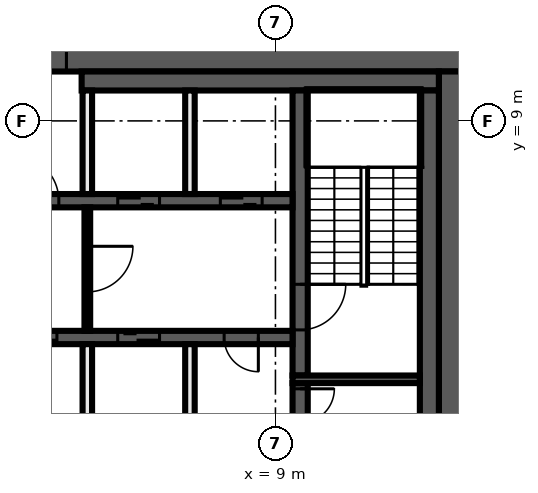
"""IFC4 building model, lengths in metres.
Left out: names, types, materials, properties, quantities, classifications, styles, units other than length and angle.
Written with IfcOpenShell. Run it as: python <this file> out.ifc"""

import sys

from ifc_helpers import new_model, si_unit, direction, frame, frame_2d, origin, place, context, subcontext, project, spatial, rectangle, extrude, element, fill, save


model = new_model("IFC4")
c1 = context("Model", 3, precision=1e-05, world=origin(), true_north=direction((0.0, 1.0)))
c2 = subcontext(c1, "Body", "Model", "MODEL_VIEW")
j1 = project(units=[si_unit("LENGTHUNIT", "METRE"), si_unit("PLANEANGLEUNIT", "RADIAN")], contexts=[c1])
p1 = place(None, origin())
s1 = spatial("IfcSite", under=j1, at=p1, CompositionType="ELEMENT")
p2 = place(p1, origin())
s2 = spatial("IfcBuilding", under=s1, at=p2, CompositionType="ELEMENT")
p3 = place(p2, frame((0.0, 0.0, 249.6)))
s3 = spatial("IfcBuildingStorey", under=s2, at=p3, CompositionType="ELEMENT", Elevation=249.6)
p4 = place(p3, frame((-14.0, 10.65, 0.0), z_axis=(0.0, 0.0, 1.0), x_axis=(1.0, 0.0, 0.0)))
e1 = element("IfcWall", 1, at=p4, inside=s3, PredefinedType="SHEAR", context=c2, shape_type="SweptSolid", body=[
    extrude(rectangle(XDim=28.0, YDim=0.7, at=frame_2d((14.0, 0.0))), origin(), (0.0, 0.0, 1.0), 3.82),
])
p5 = place(p4, frame((15.9, 0.0, 0.0)))
e2 = element("IfcOpeningElement", 2, at=p5, cuts=e1, PredefinedType="OPENING", context=c2, shape_type="SweptSolid", body=[
    extrude(rectangle(XDim=1.6, YDim=2.1, at=frame_2d((0.8, 1.05))), frame((0.0, 0.36, 0.0), z_axis=(0.0, -1.0, 0.0), x_axis=(1.0, 0.0, 0.0)), (0.0, 0.0, 1.0), 0.72),
])
p6 = place(p3, frame((13.65, 10.3, 0.0), z_axis=(0.0, 0.0, 1.0), x_axis=(0.0, -1.0, 0.0)))
e3 = element("IfcWall", 3, at=p6, inside=s3, PredefinedType="SHEAR", context=c2, shape_type="SweptSolid", body=[
    extrude(rectangle(XDim=20.6, YDim=0.7, at=frame_2d((10.3, 0.0))), origin(), (0.0, 0.0, 1.0), 3.82),
])
p7 = place(p3, frame((3.9, 10.05, 0.0), z_axis=(0.0, 0.0, 1.0), x_axis=(1.0, 0.0, 0.0)))
e4 = element("IfcWall", 4, at=p7, inside=s3, PredefinedType="SHEAR", context=c2, shape_type="SweptSolid", body=[
    extrude(rectangle(XDim=9.4, YDim=0.5, at=frame_2d((4.7, 0.0))), origin(), (0.0, 0.0, 1.0), 3.82),
])
p8 = place(p3, frame((13.05, 9.8, 0.0), z_axis=(0.0, 0.0, 1.0), x_axis=(0.0, -1.0, 0.0)))
e5 = element("IfcWall", 5, at=p8, inside=s3, PredefinedType="SHEAR", context=c2, shape_type="SweptSolid", body=[
    extrude(rectangle(XDim=19.6, YDim=0.5, at=frame_2d((9.8, 0.0))), origin(), (0.0, 0.0, 1.0), 3.82),
])
p9 = place(p3, frame((9.65, 2.1, 0.0), z_axis=(0.0, 0.0, 1.0), x_axis=(0.0, -1.0, 0.0)))
e6 = element("IfcWall", 6, at=p9, inside=s3, PredefinedType="SHEAR", context=c2, shape_type="SweptSolid", body=[
    extrude(rectangle(XDim=4.2, YDim=0.4, at=frame_2d((2.1, 0.0))), origin(), (0.0, 0.0, 1.0), 3.82),
])
p10 = place(p9, frame((0.15, 0.0, 0.0)))
e7 = element("IfcOpeningElement", 7, at=p10, cuts=e6, PredefinedType="OPENING", context=c2, shape_type="SweptSolid", body=[
    extrude(rectangle(XDim=0.9, YDim=2.1, at=frame_2d((0.45, 1.05))), frame((0.0, 0.21, 0.0), z_axis=(0.0, -1.0, 0.0), x_axis=(1.0, 0.0, 0.0)), (0.0, 0.0, 1.0), 0.42),
])
p11 = place(p3, frame((9.65, 9.8, 0.0), z_axis=(0.0, 0.0, 1.0), x_axis=(0.0, -1.0, 0.0)))
e8 = element("IfcWall", 8, at=p11, inside=s3, PredefinedType="SHEAR", context=c2, shape_type="SweptSolid", body=[
    extrude(rectangle(XDim=7.5, YDim=0.4, at=frame_2d((3.75, 0.0))), origin(), (0.0, 0.0, 1.0), 3.82),
])
p12 = place(p11, frame((5.1, 0.0, 0.0)))
e9 = element("IfcOpeningElement", 9, at=p12, cuts=e8, PredefinedType="OPENING", context=c2, shape_type="SweptSolid", body=[
    extrude(rectangle(XDim=1.2, YDim=2.1, at=frame_2d((0.6, 1.05))), frame((0.0, 0.21, 0.0), z_axis=(0.0, -1.0, 0.0), x_axis=(1.0, 0.0, 0.0)), (0.0, 0.0, 1.0), 0.42),
])
p13 = place(p3, frame((9.45, 2.2, 0.0), z_axis=(0.0, 0.0, 1.0), x_axis=(1.0, 0.0, 0.0)))
e10 = element("IfcWall", 10, at=p13, inside=s3, PredefinedType="SHEAR", context=c2, shape_type="SweptSolid", body=[
    extrude(rectangle(XDim=3.35, YDim=0.2, at=frame_2d((1.675, 0.0))), origin(), (0.0, 0.0, 1.0), 3.82),
])
p14 = place(p3, frame((-9.45, 6.9, 0.0), z_axis=(0.0, 0.0, 1.0), x_axis=(1.0, 0.0, 0.0)))
e11 = element("IfcWall", 11, at=p14, inside=s3, PredefinedType="SHEAR", context=c2, shape_type="SweptSolid", body=[
    extrude(rectangle(XDim=18.9, YDim=0.35, at=frame_2d((9.45, 0.0))), origin(), (0.0, 0.0, 1.0), 3.82),
])
p15 = place(p14, frame((11.55, 0.0, 0.0)))
e12 = element("IfcOpeningElement", 12, at=p15, cuts=e11, PredefinedType="OPENING", context=c2, shape_type="SweptSolid", body=[
    extrude(rectangle(XDim=1.2, YDim=2.1, at=frame_2d((0.6, 1.05))), frame((0.0, 0.185, 0.0), z_axis=(0.0, -1.0, 0.0), x_axis=(1.0, 0.0, 0.0)), (0.0, 0.0, 1.0), 0.37),
])
p16 = place(p14, frame((14.3, 0.0, 0.0)))
e13 = element("IfcOpeningElement", 13, at=p16, cuts=e11, PredefinedType="OPENING", context=c2, shape_type="SweptSolid", body=[
    extrude(rectangle(XDim=1.1, YDim=2.1, at=frame_2d((0.55, 1.05))), frame((0.0, 0.185, 0.0), z_axis=(0.0, -1.0, 0.0), x_axis=(1.0, 0.0, 0.0)), (0.0, 0.0, 1.0), 0.37),
])
p17 = place(p14, frame((17.0, 0.0, 0.0)))
e14 = element("IfcOpeningElement", 14, at=p17, cuts=e11, PredefinedType="OPENING", context=c2, shape_type="SweptSolid", body=[
    extrude(rectangle(XDim=1.1, YDim=2.1, at=frame_2d((0.55, 1.05))), frame((0.0, 0.185, 0.0), z_axis=(0.0, -1.0, 0.0), x_axis=(1.0, 0.0, 0.0)), (0.0, 0.0, 1.0), 0.37),
])
p18 = place(p14, frame((0.9, 0.0, 0.0)))
e15 = element("IfcOpeningElement", 15, at=p18, cuts=e11, PredefinedType="OPENING", context=c2, shape_type="SweptSolid", body=[
    extrude(rectangle(XDim=0.9, YDim=2.1, at=frame_2d((0.45, 1.05))), frame((0.0, 0.185, 0.0), z_axis=(0.0, -1.0, 0.0), x_axis=(1.0, 0.0, 0.0)), (0.0, 0.0, 1.0), 0.37),
])
p19 = place(p14, frame((3.6, 0.0, 0.0)))
e16 = element("IfcOpeningElement", 16, at=p19, cuts=e11, PredefinedType="OPENING", context=c2, shape_type="SweptSolid", body=[
    extrude(rectangle(XDim=0.9, YDim=2.1, at=frame_2d((0.45, 1.05))), frame((0.0, 0.185, 0.0), z_axis=(0.0, -1.0, 0.0), x_axis=(1.0, 0.0, 0.0)), (0.0, 0.0, 1.0), 0.37),
])
p20 = place(p14, frame((6.3, 0.0, 0.0)))
e17 = element("IfcOpeningElement", 17, at=p20, cuts=e11, PredefinedType="OPENING", context=c2, shape_type="SweptSolid", body=[
    extrude(rectangle(XDim=0.9, YDim=2.1, at=frame_2d((0.45, 1.05))), frame((0.0, 0.185, 0.0), z_axis=(0.0, -1.0, 0.0), x_axis=(1.0, 0.0, 0.0)), (0.0, 0.0, 1.0), 0.37),
])
p21 = place(p14, frame((9.0, 0.0, 0.0)))
e18 = element("IfcOpeningElement", 18, at=p21, cuts=e11, PredefinedType="OPENING", context=c2, shape_type="SweptSolid", body=[
    extrude(rectangle(XDim=0.9, YDim=2.1, at=frame_2d((0.45, 1.05))), frame((0.0, 0.185, 0.0), z_axis=(0.0, -1.0, 0.0), x_axis=(1.0, 0.0, 0.0)), (0.0, 0.0, 1.0), 0.37),
])
p22 = place(p3, frame((9.45, 3.3, 0.0), z_axis=(0.0, 0.0, 1.0), x_axis=(-1.0, 0.0, 0.0)))
e19 = element("IfcWall", 19, at=p22, inside=s3, PredefinedType="SHEAR", context=c2, shape_type="SweptSolid", body=[
    extrude(rectangle(XDim=18.9, YDim=0.35, at=frame_2d((9.45, 0.0))), origin(), (0.0, 0.0, 1.0), 3.82),
])
p23 = place(p22, frame((6.2, 0.0, 0.0)))
e20 = element("IfcOpeningElement", 20, at=p23, cuts=e19, PredefinedType="OPENING", context=c2, shape_type="SweptSolid", body=[
    extrude(rectangle(XDim=1.1, YDim=2.1, at=frame_2d((0.55, 1.05))), frame((0.0, 0.185, 0.0), z_axis=(0.0, -1.0, 0.0), x_axis=(1.0, 0.0, 0.0)), (0.0, 0.0, 1.0), 0.37),
])
p24 = place(p22, frame((3.5, 0.0, 0.0)))
e21 = element("IfcOpeningElement", 21, at=p24, cuts=e19, PredefinedType="OPENING", context=c2, shape_type="SweptSolid", body=[
    extrude(rectangle(XDim=1.1, YDim=2.1, at=frame_2d((0.55, 1.05))), frame((0.0, 0.185, 0.0), z_axis=(0.0, -1.0, 0.0), x_axis=(1.0, 0.0, 0.0)), (0.0, 0.0, 1.0), 0.37),
])
p25 = place(p22, frame((0.9, 0.0, 0.0)))
e22 = element("IfcOpeningElement", 22, at=p25, cuts=e19, PredefinedType="OPENING", context=c2, shape_type="SweptSolid", body=[
    extrude(rectangle(XDim=0.9, YDim=2.1, at=frame_2d((0.45, 1.05))), frame((0.0, 0.185, 0.0), z_axis=(0.0, -1.0, 0.0), x_axis=(1.0, 0.0, 0.0)), (0.0, 0.0, 1.0), 0.37),
])
p26 = place(p22, frame((15.75, 0.0, 0.0)))
e23 = element("IfcOpeningElement", 23, at=p26, cuts=e19, PredefinedType="OPENING", context=c2, shape_type="SweptSolid", body=[
    extrude(rectangle(XDim=0.9, YDim=2.1, at=frame_2d((0.45, 1.05))), frame((0.0, 0.185, 0.0), z_axis=(0.0, -1.0, 0.0), x_axis=(1.0, 0.0, 0.0)), (0.0, 0.0, 1.0), 0.37),
])
p27 = place(p22, frame((10.35, 0.0, 0.0)))
e24 = element("IfcOpeningElement", 24, at=p27, cuts=e19, PredefinedType="OPENING", context=c2, shape_type="SweptSolid", body=[
    extrude(rectangle(XDim=0.9, YDim=2.1, at=frame_2d((0.45, 1.05))), frame((0.0, 0.185, 0.0), z_axis=(0.0, -1.0, 0.0), x_axis=(1.0, 0.0, 0.0)), (0.0, 0.0, 1.0), 0.37),
])
for number, where, z_axis, x_axis in (
    (25, (6.75, 0.4, 0.0), (0.0, 0.0, 1.0), (0.0, 1.0, 0.0)),
    (26, (6.75, 7.075, 0.0), (0.0, 0.0, 1.0), (0.0, 1.0, 0.0)),
):
    element("IfcWall", number, at=place(p3, frame(where, z_axis=z_axis, x_axis=x_axis)), inside=s3, PredefinedType="SOLIDWALL", context=c2, shape_type="SweptSolid", body=[
        extrude(rectangle(XDim=2.725, YDim=0.25, at=frame_2d((1.363, 0.0))), origin(), (0.0, 0.0, 1.0), 3.82),
    ])
p28 = place(p3, frame((4.05, 6.725, 0.0), z_axis=(0.0, 0.0, 1.0), x_axis=(0.0, -1.0, 0.0)))
e27 = element("IfcWall", 27, at=p28, inside=s3, PredefinedType="PARTITIONING", context=c2, shape_type="SweptSolid", body=[
    extrude(rectangle(XDim=3.25, YDim=0.15, at=frame_2d((1.625, 0.0))), origin(), (0.0, 0.0, 1.0), 3.82),
])
p29 = place(p28, frame((1.025, 0.0, 0.0)))
e28 = element("IfcOpeningElement", 28, at=p29, cuts=e27, PredefinedType="OPENING", context=c2, shape_type="SweptSolid", body=[
    extrude(rectangle(XDim=1.2, YDim=2.1, at=frame_2d((0.6, 1.05))), frame((0.0, 0.085, 0.0), z_axis=(0.0, -1.0, 0.0), x_axis=(1.0, 0.0, 0.0)), (0.0, 0.0, 1.0), 0.17),
])
for number, where, z_axis, x_axis in (
    (29, (4.05, 0.4, 0.0), (0.0, 0.0, 1.0), (0.0, 1.0, 0.0)),
    (30, (4.05, 7.075, 0.0), (0.0, 0.0, 1.0), (0.0, 1.0, 0.0)),
):
    element("IfcWall", number, at=place(p3, frame(where, z_axis=z_axis, x_axis=x_axis)), inside=s3, PredefinedType="SOLIDWALL", context=c2, shape_type="SweptSolid", body=[
        extrude(rectangle(XDim=2.725, YDim=0.25, at=frame_2d((1.363, 0.0))), origin(), (0.0, 0.0, 1.0), 3.82),
    ])
p30 = place(p10, origin())
e31 = element("IfcDoor", 31, at=p30, inside=s3, OperationType="SINGLE_SWING_RIGHT", PredefinedType="DOOR", context=c2, shape_type="SweptSolid", body=[
    extrude(rectangle(XDim=0.9, YDim=2.1, at=frame_2d((0.45, 1.05))), frame((0.0, 0.025, 0.0), z_axis=(0.0, -1.0, 0.0), x_axis=(1.0, 0.0, 0.0)), (0.0, 0.0, 1.0), 0.05),
])
fill(e7, e31)
p31 = place(p5, origin())
e32 = element("IfcDoor", 32, at=p31, inside=s3, OperationType="DOUBLE_DOOR_SINGLE_SWING", PredefinedType="DOOR", context=c2, shape_type="SweptSolid", body=[
    extrude(rectangle(XDim=1.6, YDim=2.1, at=frame_2d((0.8, 1.05))), frame((0.0, 0.025, 0.0), z_axis=(0.0, -1.0, 0.0), x_axis=(1.0, 0.0, 0.0)), (0.0, 0.0, 1.0), 0.05),
])
fill(e2, e32)
p32 = place(p15, origin())
e33 = element("IfcDoor", 33, at=p32, inside=s3, OperationType="SINGLE_SWING_LEFT", PredefinedType="DOOR", context=c2, shape_type="SweptSolid", body=[
    extrude(rectangle(XDim=1.2, YDim=2.1, at=frame_2d((0.6, 1.05))), frame((0.0, 0.025, 0.0), z_axis=(0.0, -1.0, 0.0), x_axis=(1.0, 0.0, 0.0)), (0.0, 0.0, 1.0), 0.05),
])
fill(e12, e33)
p33 = place(p16, origin())
e34 = element("IfcDoor", 34, at=p33, inside=s3, OperationType="DOUBLE_DOOR_SLIDING", PredefinedType="DOOR", context=c2, shape_type="SweptSolid", body=[
    extrude(rectangle(XDim=1.1, YDim=2.1, at=frame_2d((0.55, 1.05))), frame((0.0, 0.025, 0.0), z_axis=(0.0, -1.0, 0.0), x_axis=(1.0, 0.0, 0.0)), (0.0, 0.0, 1.0), 0.05),
])
fill(e13, e34)
p34 = place(p17, origin())
e35 = element("IfcDoor", 35, at=p34, inside=s3, OperationType="DOUBLE_DOOR_SLIDING", PredefinedType="DOOR", context=c2, shape_type="SweptSolid", body=[
    extrude(rectangle(XDim=1.1, YDim=2.1, at=frame_2d((0.55, 1.05))), frame((0.0, 0.025, 0.0), z_axis=(0.0, -1.0, 0.0), x_axis=(1.0, 0.0, 0.0)), (0.0, 0.0, 1.0), 0.05),
])
fill(e14, e35)
p35 = place(p23, origin())
e36 = element("IfcDoor", 36, at=p35, inside=s3, OperationType="DOUBLE_DOOR_SLIDING", PredefinedType="DOOR", context=c2, shape_type="SweptSolid", body=[
    extrude(rectangle(XDim=1.1, YDim=2.1, at=frame_2d((0.55, 1.05))), frame((0.0, 0.025, 0.0), z_axis=(0.0, -1.0, 0.0), x_axis=(1.0, 0.0, 0.0)), (0.0, 0.0, 1.0), 0.05),
])
fill(e20, e36)
p36 = place(p24, origin())
e37 = element("IfcDoor", 37, at=p36, inside=s3, OperationType="DOUBLE_DOOR_SLIDING", PredefinedType="DOOR", context=c2, shape_type="SweptSolid", body=[
    extrude(rectangle(XDim=1.1, YDim=2.1, at=frame_2d((0.55, 1.05))), frame((0.0, 0.025, 0.0), z_axis=(0.0, -1.0, 0.0), x_axis=(1.0, 0.0, 0.0)), (0.0, 0.0, 1.0), 0.05),
])
fill(e21, e37)
p37 = place(p25, origin())
e38 = element("IfcDoor", 38, at=p37, inside=s3, OperationType="SINGLE_SWING_LEFT", PredefinedType="DOOR", context=c2, shape_type="SweptSolid", body=[
    extrude(rectangle(XDim=0.9, YDim=2.1, at=frame_2d((0.45, 1.05))), frame((0.0, 0.025, 0.0), z_axis=(0.0, -1.0, 0.0), x_axis=(1.0, 0.0, 0.0)), (0.0, 0.0, 1.0), 0.05),
])
fill(e22, e38)
p38 = place(p12, origin())
e39 = element("IfcDoor", 39, at=p38, inside=s3, OperationType="SINGLE_SWING_LEFT", PredefinedType="DOOR", context=c2, shape_type="SweptSolid", body=[
    extrude(rectangle(XDim=1.2, YDim=2.1, at=frame_2d((0.6, 1.05))), frame((0.0, 0.025, 0.0), z_axis=(0.0, -1.0, 0.0), x_axis=(1.0, 0.0, 0.0)), (0.0, 0.0, 1.0), 0.05),
])
fill(e9, e39)
p39 = place(p29, origin())
e40 = element("IfcDoor", 40, at=p39, inside=s3, OperationType="SINGLE_SWING_RIGHT", PredefinedType="DOOR", context=c2, shape_type="SweptSolid", body=[
    extrude(rectangle(XDim=1.2, YDim=2.1, at=frame_2d((0.6, 1.05))), frame((0.0, 0.025, 0.0), z_axis=(0.0, -1.0, 0.0), x_axis=(1.0, 0.0, 0.0)), (0.0, 0.0, 1.0), 0.05),
])
fill(e28, e40)
save(model, sys.argv[1])
